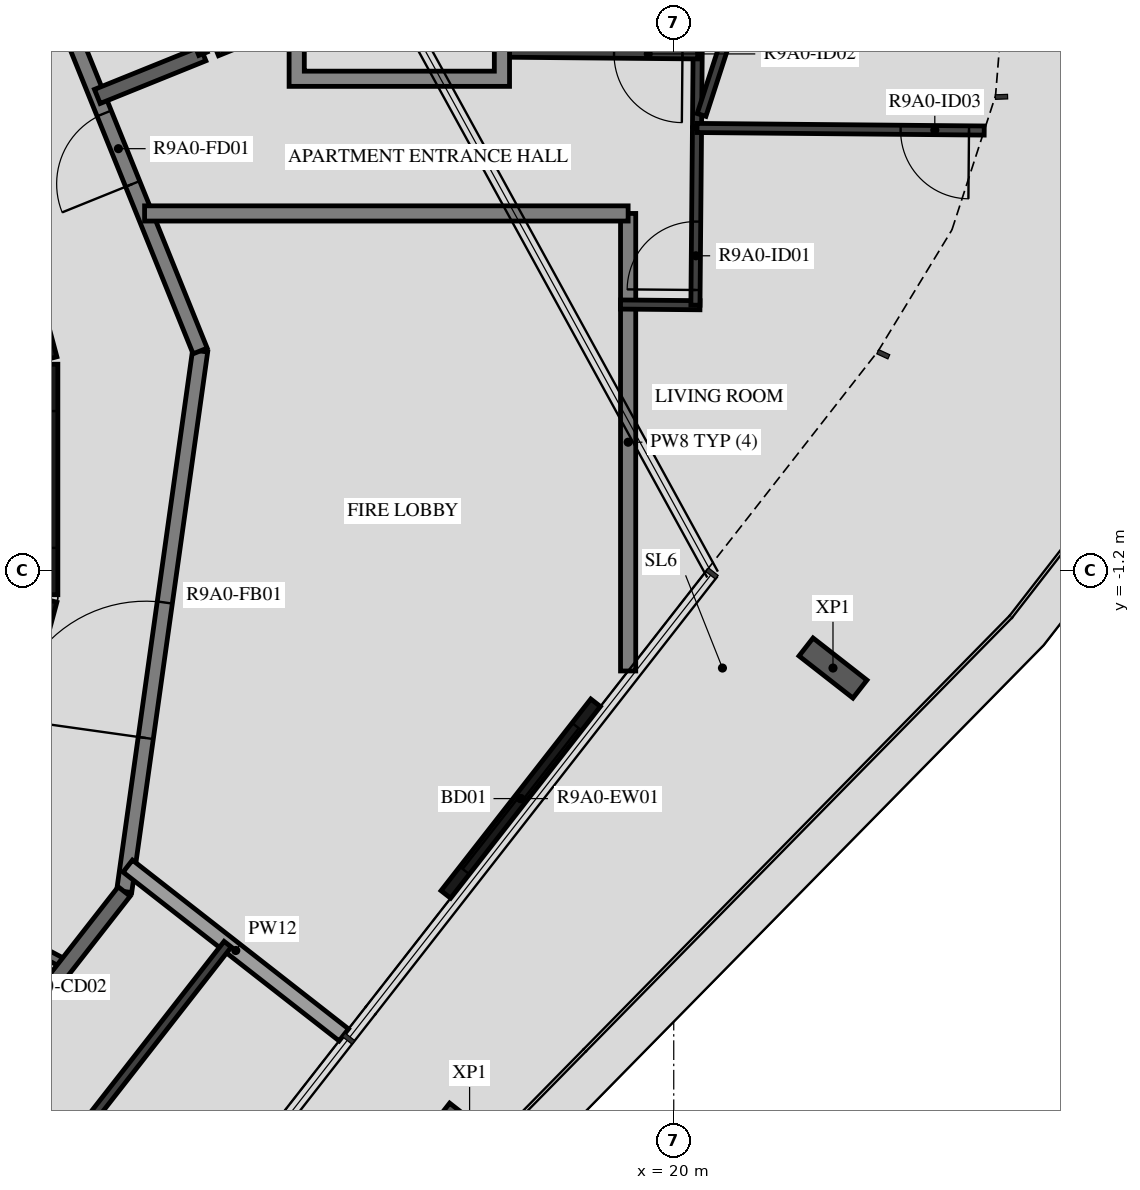
"""IFC4 building model, lengths in metres.
Left out: names, types, materials, properties, quantities, classifications, styles, units other than length and angle.
Written with IfcOpenShell. Run it as: python <this file> out.ifc"""

import sys

from ifc_helpers import new_model, si_unit, direction, frame, frame_2d, origin, origin_2d, place, context, subcontext, project, spatial, polyline, rectangle, i_section, outline, extrude, element, fill, save


model = new_model("IFC4")
c1 = context("Model", 3, precision=1e-05, world=origin(), true_north=direction((0.0, 1.0)))
c2 = subcontext(c1, "Body", "Model", "MODEL_VIEW")
j1 = project(units=[si_unit("LENGTHUNIT", "METRE"), si_unit("PLANEANGLEUNIT", "RADIAN")], contexts=[c1])
p1 = place(None, origin())
s1 = spatial("IfcSite", under=j1, at=p1, CompositionType="ELEMENT")
p2 = place(p1, origin())
s2 = spatial("IfcBuilding", under=s1, at=p2, CompositionType="ELEMENT")
p3 = place(p2, frame((0.0, 0.0, 333.0)))
s3 = spatial("IfcBuildingStorey", under=s2, at=p3, CompositionType="ELEMENT", Elevation=333.0)
for number, where, z_axis, x_axis in (
    (1, (17.314, -8.6, -0.45), (0.0, 0.0, 1.0), (-0.616, -0.788, 0.0)),
    (2, (22.095, -2.481, -0.45), (0.0, 0.0, 1.0), (-0.616, -0.788, 0.0)),
):
    element("IfcColumn", number, at=place(p3, frame(where, z_axis=z_axis, x_axis=x_axis)), inside=s3, PredefinedType="COLUMN", context=c2, shape_type="SweptSolid", body=[
        extrude(i_section(OverallWidth=0.3, OverallDepth=0.9, WebThickness=0.019, FlangeThickness=0.035, FilletRadius=0.03, at=origin_2d()), origin(), (0.0, 0.0, 1.0), 3.57),
    ])
p4 = place(p3, frame((17.002, -5.459, 0.0), z_axis=(0.0, 0.0, 1.0), x_axis=(0.615666248856, 0.788007024093, 0.0)))
e3 = element("IfcWall", 3, at=p4, inside=s3, PredefinedType="STANDARD", context=c2, shape_type="SweptSolid", body=[
    extrude(rectangle(XDim=3.2, YDim=0.16, at=frame_2d((1.6, 0.0))), origin(), (0.0, 0.0, 1.0), 3.12),
])
p5 = place(p4, frame((0.4, 0.0, 0.0)))
e4 = element("IfcOpeningElement", 4, at=p5, cuts=e3, PredefinedType="OPENING", context=c2, shape_type="SweptSolid", body=[
    extrude(rectangle(XDim=2.4, YDim=2.4, at=frame_2d((1.2, 1.2))), frame((0.0, 0.09, 0.0), z_axis=(0.0, -1.0, 0.0), x_axis=(1.0, 0.0, 0.0)), (0.0, 0.0, 1.0), 0.18),
])
p6 = place(p3, frame((10.858, -4.479, 0.0), z_axis=(0.0, 0.0, 1.0), x_axis=(0.258734743916, 0.965948410781, 0.0)))
e5 = element("IfcWall", 5, at=p6, inside=s3, PredefinedType="SHEAR", context=c2, shape_type="SweptSolid", body=[
    extrude(rectangle(XDim=3.033, YDim=0.5, at=frame_2d((1.516, 0.0))), origin(), (0.0, 0.0, 1.0), 3.12),
])
p7 = place(p3, frame((11.647, -1.516, 0.0), z_axis=(0.0, 0.0, 1.0), x_axis=(0.0, 1.0, 0.0)))
e6 = element("IfcWall", 6, at=p7, inside=s3, PredefinedType="SHEAR", context=c2, shape_type="SweptSolid", body=[
    extrude(rectangle(XDim=3.033, YDim=0.5, at=frame_2d((1.516, 0.0))), origin(), (0.0, 0.0, 1.0), 3.12),
])
p8 = place(p7, frame((0.616, 0.0, 0.0)))
e7 = element("IfcOpeningElement", 7, at=p8, cuts=e6, PredefinedType="OPENING", context=c2, shape_type="SweptSolid", body=[
    extrude(rectangle(XDim=1.8, YDim=2.1, at=frame_2d((0.9, 1.05))), frame((0.0, 0.26, 0.0), z_axis=(0.0, -1.0, 0.0), x_axis=(1.0, 0.0, 0.0)), (0.0, 0.0, 1.0), 0.52),
])
p9 = place(p3, frame((11.643, 1.55, 0.0), z_axis=(0.0, 0.0, 1.0), x_axis=(-0.258734743916, 0.965948410781, 0.0)))
e8 = element("IfcWall", 8, at=p9, inside=s3, PredefinedType="SHEAR", context=c2, shape_type="SweptSolid", body=[
    extrude(rectangle(XDim=3.033, YDim=0.5, at=frame_2d((1.516, 0.0))), origin(), (0.0, 0.0, 1.0), 3.12),
])
p10 = place(p3, frame((10.511, -5.589, 0.0), z_axis=(0.0, 0.0, 1.0), x_axis=(0.882959677414, -0.469448834337, 0.0)))
e9 = element("IfcWall", 9, at=p10, inside=s3, PredefinedType="PARTITIONING", context=c2, shape_type="SweptSolid", body=[
    extrude(rectangle(XDim=1.702, YDim=0.12, at=frame_2d((0.851, 0.0))), origin(), (0.0, 0.0, 1.0), 3.12),
])
p11 = place(p10, frame((0.1, 0.0, 0.0)))
e10 = element("IfcOpeningElement", 10, at=p11, cuts=e9, PredefinedType="OPENING", context=c2, shape_type="SweptSolid", body=[
    extrude(rectangle(XDim=1.2, YDim=2.1, at=frame_2d((0.6, 1.05))), frame((0.0, 0.07, 0.0), z_axis=(0.0, -1.0, 0.0), x_axis=(1.0, 0.0, 0.0)), (0.0, 0.0, 1.0), 0.14),
])
p12 = place(p3, frame((12.77, -5.42, 0.0), z_axis=(0.0, 0.0, 1.0), x_axis=(0.139155334385, 0.990270565508, 0.0)))
e11 = element("IfcWall", 11, at=p12, inside=s3, PredefinedType="STANDARD", context=c2, shape_type="SweptSolid", body=[
    extrude(rectangle(XDim=7.181, YDim=0.2, at=frame_2d((3.59, 0.0))), origin(), (0.0, 0.0, 1.0), 3.12),
])
p13 = place(p12, frame((2.039, 0.0, 0.0)))
e12 = element("IfcOpeningElement", 12, at=p13, cuts=e11, PredefinedType="OPENING", context=c2, shape_type="SweptSolid", body=[
    extrude(rectangle(XDim=1.8, YDim=2.1, at=frame_2d((0.9, 1.05))), frame((0.0, 0.11, 0.0), z_axis=(0.0, -1.0, 0.0), x_axis=(1.0, 0.0, 0.0)), (0.0, 0.0, 1.0), 0.22),
])
p14 = place(p3, frame((13.769, 1.691, 0.0), z_axis=(0.0, 0.0, 1.0), x_axis=(-0.374618189599, 0.92717916932, 0.0)))
e13 = element("IfcWall", 13, at=p14, inside=s3, PredefinedType="STANDARD", context=c2, shape_type="SweptSolid", body=[
    extrude(rectangle(XDim=7.181, YDim=0.2, at=frame_2d((3.591, 0.0))), origin(), (0.0, 0.0, 1.0), 3.12),
])
p15 = place(p14, frame((2.371, 0.0, 0.0)))
e14 = element("IfcOpeningElement", 14, at=p15, cuts=e13, PredefinedType="OPENING", context=c2, shape_type="SweptSolid", body=[
    extrude(rectangle(XDim=1.0, YDim=2.1, at=frame_2d((0.5, 1.05))), frame((0.0, 0.11, 0.0), z_axis=(0.0, -1.0, 0.0), x_axis=(1.0, 0.0, 0.0)), (0.0, 0.0, 1.0), 0.22),
])
p16 = place(p3, frame((8.349, -11.079, 0.0), z_axis=(0.0, 0.0, 1.0), x_axis=(0.615669112324, 0.78800478687, 0.0)))
e15 = element("IfcWall", 15, at=p16, inside=s3, PredefinedType="STANDARD", context=c2, shape_type="SweptSolid", body=[
    extrude(rectangle(XDim=7.181, YDim=0.2, at=frame_2d((3.591, 0.0))), origin(), (0.0, 0.0, 1.0), 3.12),
])
p17 = place(p3, frame((19.4, -2.519, 0.0), z_axis=(0.0, 0.0, 1.0), x_axis=(0.0, 1.0, 0.0)))
e16 = element("IfcWall", 16, at=p17, inside=s3, PredefinedType="STANDARD", context=c2, shape_type="SweptSolid", body=[
    extrude(rectangle(XDim=6.019, YDim=0.2, at=frame_2d((3.01, 0.0))), origin(), (0.0, 0.0, 1.0), 3.12),
])
p18 = place(p3, frame((19.4, 3.5, 0.0), z_axis=(0.0, 0.0, 1.0), x_axis=(-1.0, 0.0, 0.0)))
e17 = element("IfcWall", 17, at=p18, inside=s3, PredefinedType="STANDARD", context=c2, shape_type="SweptSolid", body=[
    extrude(rectangle(XDim=6.362, YDim=0.2, at=frame_2d((3.181, 0.0))), origin(), (0.0, 0.0, 1.0), 3.12),
])
p19 = place(p3, frame((12.817, -5.086, 0.0), z_axis=(0.0, 0.0, 1.0), x_axis=(0.787994616725, -0.615682129034, 0.0)))
e18 = element("IfcWall", 18, at=p19, inside=s3, PredefinedType="STANDARD", context=c2, shape_type="SweptSolid", body=[
    extrude(rectangle(XDim=3.607, YDim=0.2, at=frame_2d((1.804, 0.0))), origin(), (0.0, 0.0, 1.0), 2.73),
])
p20 = place(p3, frame((13.807, 5.601, 0.0), z_axis=(0.0, 0.0, 1.0), x_axis=(-0.927202702405, -0.374559939999, 0.0)))
e19 = element("IfcWall", 19, at=p20, inside=s3, PredefinedType="STANDARD", context=c2, shape_type="SweptSolid", body=[
    extrude(rectangle(XDim=1.5, YDim=0.2, at=frame_2d((0.75, 0.0))), origin(), (0.0, 0.0, 1.0), 3.12),
])
p21 = place(p3, frame((14.934, 6.056, 0.0), z_axis=(0.0, 0.0, 1.0), x_axis=(-0.927219802432, -0.374517607032, 0.0)))
e20 = element("IfcWall", 20, at=p21, inside=s3, PredefinedType="STANDARD", context=c2, shape_type="SweptSolid", body=[
    extrude(rectangle(XDim=1.036, YDim=0.2, at=frame_2d((0.518, 0.0))), origin(), (0.0, 0.0, 1.0), 3.12),
])
p22 = place(p3, frame((19.3, 2.302, 0.0), z_axis=(0.0, 0.0, 1.0), x_axis=(0.999958506341, -0.009109643015, 0.0)))
e21 = element("IfcWall", 21, at=p22, inside=s3, PredefinedType="PARTITIONING", context=c2, shape_type="SweptSolid", body=[
    extrude(rectangle(XDim=1.045, YDim=0.12, at=frame_2d((0.522, 0.0))), origin(), (0.0, 0.0, 1.0), 3.12),
])
p23 = place(p3, frame((20.285, 2.293, 0.0), z_axis=(0.0, 0.0, 1.0), x_axis=(0.008900171034, 0.999960392693, 0.0)))
e22 = element("IfcWall", 22, at=p23, inside=s3, PredefinedType="PARTITIONING", context=c2, shape_type="SweptSolid", body=[
    extrude(rectangle(XDim=2.332, YDim=0.12, at=frame_2d((1.166, 0.0))), origin(), (0.0, 0.0, 1.0), 3.12),
])
p24 = place(p23, frame((0.2, 0.0, 0.0)))
e23 = element("IfcOpeningElement", 23, at=p24, cuts=e22, PredefinedType="OPENING", context=c2, shape_type="SweptSolid", body=[
    extrude(rectangle(XDim=0.9, YDim=2.1, at=frame_2d((0.45, 1.05))), frame((0.0, 0.07, 0.0), z_axis=(0.0, -1.0, 0.0), x_axis=(1.0, 0.0, 0.0)), (0.0, 0.0, 1.0), 0.14),
])
p25 = place(p3, frame((20.306, 4.639, 0.0), z_axis=(0.0, 0.0, 1.0), x_axis=(0.008906724211, 0.999960334345, 0.0)))
e24 = element("IfcWall", 24, at=p25, inside=s3, PredefinedType="PARTITIONING", context=c2, shape_type="SweptSolid", body=[
    extrude(rectangle(XDim=1.014, YDim=0.12, at=frame_2d((0.507, 0.0))), origin(), (0.0, 0.0, 1.0), 3.12),
])
p26 = place(p3, frame((20.315, 5.593, 0.0), z_axis=(0.0, 0.0, 1.0), x_axis=(-0.999960597409, 0.008877140833, 0.0)))
e25 = element("IfcWall", 25, at=p26, inside=s3, PredefinedType="PARTITIONING", context=c2, shape_type="SweptSolid", body=[
    extrude(rectangle(XDim=2.475, YDim=0.12, at=frame_2d((1.238, 0.0))), origin(), (0.0, 0.0, 1.0), 3.12),
])
p27 = place(p26, frame((0.2, 0.0, 0.0)))
e26 = element("IfcOpeningElement", 26, at=p27, cuts=e25, PredefinedType="OPENING", context=c2, shape_type="SweptSolid", body=[
    extrude(rectangle(XDim=0.9, YDim=2.1, at=frame_2d((0.45, 1.05))), frame((0.0, 0.07, 0.0), z_axis=(0.0, -1.0, 0.0), x_axis=(1.0, 0.0, 0.0)), (0.0, 0.0, 1.0), 0.14),
])
p28 = place(p3, frame((24.085, 4.591, 0.0), z_axis=(0.0, 0.0, 1.0), x_axis=(-0.99996025077, 0.008916102255, 0.0)))
e27 = element("IfcWall", 27, at=p28, inside=s3, PredefinedType="PARTITIONING", context=c2, shape_type="SweptSolid", body=[
    extrude(rectangle(XDim=3.779, YDim=0.12, at=frame_2d((1.889, 0.0))), origin(), (0.0, 0.0, 1.0), 2.73),
])
p29 = place(p28, frame((0.2, 0.0, 0.0)))
e28 = element("IfcOpeningElement", 28, at=p29, cuts=e27, PredefinedType="OPENING", context=c2, shape_type="SweptSolid", body=[
    extrude(rectangle(XDim=0.9, YDim=2.1, at=frame_2d((0.45, 1.05))), frame((0.0, 0.07, 0.0), z_axis=(0.0, -1.0, 0.0), x_axis=(1.0, 0.0, 0.0)), (0.0, 0.0, 1.0), 0.14),
])
p30 = place(p3, frame((20.68, 5.762, 0.0), z_axis=(0.0, 0.0, 1.0), x_axis=(-0.30908063779, -0.951035834942, 0.0)))
e29 = element("IfcWall", 29, at=p30, inside=s3, PredefinedType="PARTITIONING", context=c2, shape_type="SweptSolid", body=[
    extrude(rectangle(XDim=1.016, YDim=0.12, at=frame_2d((0.508, 0.0))), origin(), (0.0, 0.0, 1.0), 3.12),
])
p31 = place(p3, frame((13.807, 5.601, 0.0), z_axis=(0.0, 0.0, 1.0), x_axis=(-0.374480699852, 0.927234708927, 0.0)))
e30 = element("IfcWall", 30, at=p31, inside=s3, PredefinedType="PARTITIONING", context=c2, shape_type="SweptSolid", body=[
    extrude(rectangle(XDim=1.144, YDim=0.12, at=frame_2d((0.572, 0.0))), origin(), (0.0, 0.0, 1.0), 3.12),
])
p32 = place(p3, frame((9.351, -12.233, 0.0), z_axis=(0.0, 0.0, 1.0), x_axis=(0.615678207218, 0.787997680933, 0.0)))
e31 = element("IfcWall", 31, at=p32, inside=s3, PredefinedType="PARTITIONING", context=c2, shape_type="SweptSolid", body=[
    extrude(rectangle(XDim=7.765, YDim=0.12, at=frame_2d((3.883, 0.0))), origin(), (0.0, 0.0, 1.0), 3.12),
])
p33 = place(p32, frame((0.2, 0.0, 0.0)))
e32 = element("IfcOpeningElement", 32, at=p33, cuts=e31, PredefinedType="OPENING", context=c2, shape_type="SweptSolid", body=[
    extrude(rectangle(XDim=0.9, YDim=2.1, at=frame_2d((0.45, 1.05))), frame((0.0, 0.07, 0.0), z_axis=(0.0, -1.0, 0.0), x_axis=(1.0, 0.0, 0.0)), (0.0, 0.0, 1.0), 0.14),
])
p34 = place(p3, origin())
e33 = element("IfcWall", 33, at=p34, inside=s3, PredefinedType="STANDARD", context=c2, shape_type="SweptSolid", body=[
    extrude(outline(polyline([(17.84, 8.072), (17.84, 5.172), (14.94, 5.172), (14.94, 8.072), (17.84, 8.072)]), holes=[polyline([(15.14, 5.372), (17.64, 5.372), (17.64, 7.872), (15.14, 7.872), (15.14, 5.372)])]), origin(), (0.0, 0.0, 1.0), 3.12),
])
p35 = place(p5, origin())
e34 = element("IfcDoor", 34, at=p35, inside=s3, OperationType="DOUBLE_DOOR_SLIDING", PredefinedType="DOOR", context=c2, shape_type="SweptSolid", body=[
    extrude(rectangle(XDim=2.4, YDim=2.4, at=frame_2d((1.2, 1.2))), frame((0.0, 0.025, 0.0), z_axis=(0.0, -1.0, 0.0), x_axis=(1.0, 0.0, 0.0)), (0.0, 0.0, 1.0), 0.05),
])
fill(e4, e34)
p36 = place(p15, origin())
e35 = element("IfcDoor", 35, at=p36, inside=s3, OperationType="SINGLE_SWING_LEFT", PredefinedType="DOOR", context=c2, shape_type="SweptSolid", body=[
    extrude(rectangle(XDim=1.0, YDim=2.1, at=frame_2d((0.5, 1.05))), frame((0.0, 0.025, 0.0), z_axis=(0.0, -1.0, 0.0), x_axis=(1.0, 0.0, 0.0)), (0.0, 0.0, 1.0), 0.05),
])
fill(e14, e35)
p37 = place(p24, origin())
e36 = element("IfcDoor", 36, at=p37, inside=s3, OperationType="SINGLE_SWING_RIGHT", PredefinedType="DOOR", context=c2, shape_type="SweptSolid", body=[
    extrude(rectangle(XDim=0.9, YDim=2.1, at=frame_2d((0.45, 1.05))), frame((0.0, 0.025, 0.0), z_axis=(0.0, -1.0, 0.0), x_axis=(1.0, 0.0, 0.0)), (0.0, 0.0, 1.0), 0.05),
])
fill(e23, e36)
p38 = place(p27, origin())
e37 = element("IfcDoor", 37, at=p38, inside=s3, OperationType="SINGLE_SWING_RIGHT", PredefinedType="DOOR", context=c2, shape_type="SweptSolid", body=[
    extrude(rectangle(XDim=0.9, YDim=2.1, at=frame_2d((0.45, 1.05))), frame((0.0, 0.025, 0.0), z_axis=(0.0, -1.0, 0.0), x_axis=(1.0, 0.0, 0.0)), (0.0, 0.0, 1.0), 0.05),
])
fill(e26, e37)
p39 = place(p29, origin())
e38 = element("IfcDoor", 38, at=p39, inside=s3, OperationType="SINGLE_SWING_RIGHT", PredefinedType="DOOR", context=c2, shape_type="SweptSolid", body=[
    extrude(rectangle(XDim=0.9, YDim=2.1, at=frame_2d((0.45, 1.05))), frame((0.0, 0.025, 0.0), z_axis=(0.0, -1.0, 0.0), x_axis=(1.0, 0.0, 0.0)), (0.0, 0.0, 1.0), 0.05),
])
fill(e28, e38)
p40 = place(p13, origin())
e39 = element("IfcDoor", 39, at=p40, inside=s3, OperationType="DOUBLE_DOOR_SINGLE_SWING", PredefinedType="DOOR", context=c2, shape_type="SweptSolid", body=[
    extrude(rectangle(XDim=1.8, YDim=2.1, at=frame_2d((0.9, 1.05))), frame((0.0, 0.025, 0.0), z_axis=(0.0, -1.0, 0.0), x_axis=(1.0, 0.0, 0.0)), (0.0, 0.0, 1.0), 0.05),
])
fill(e12, e39)
save(model, sys.argv[1])
